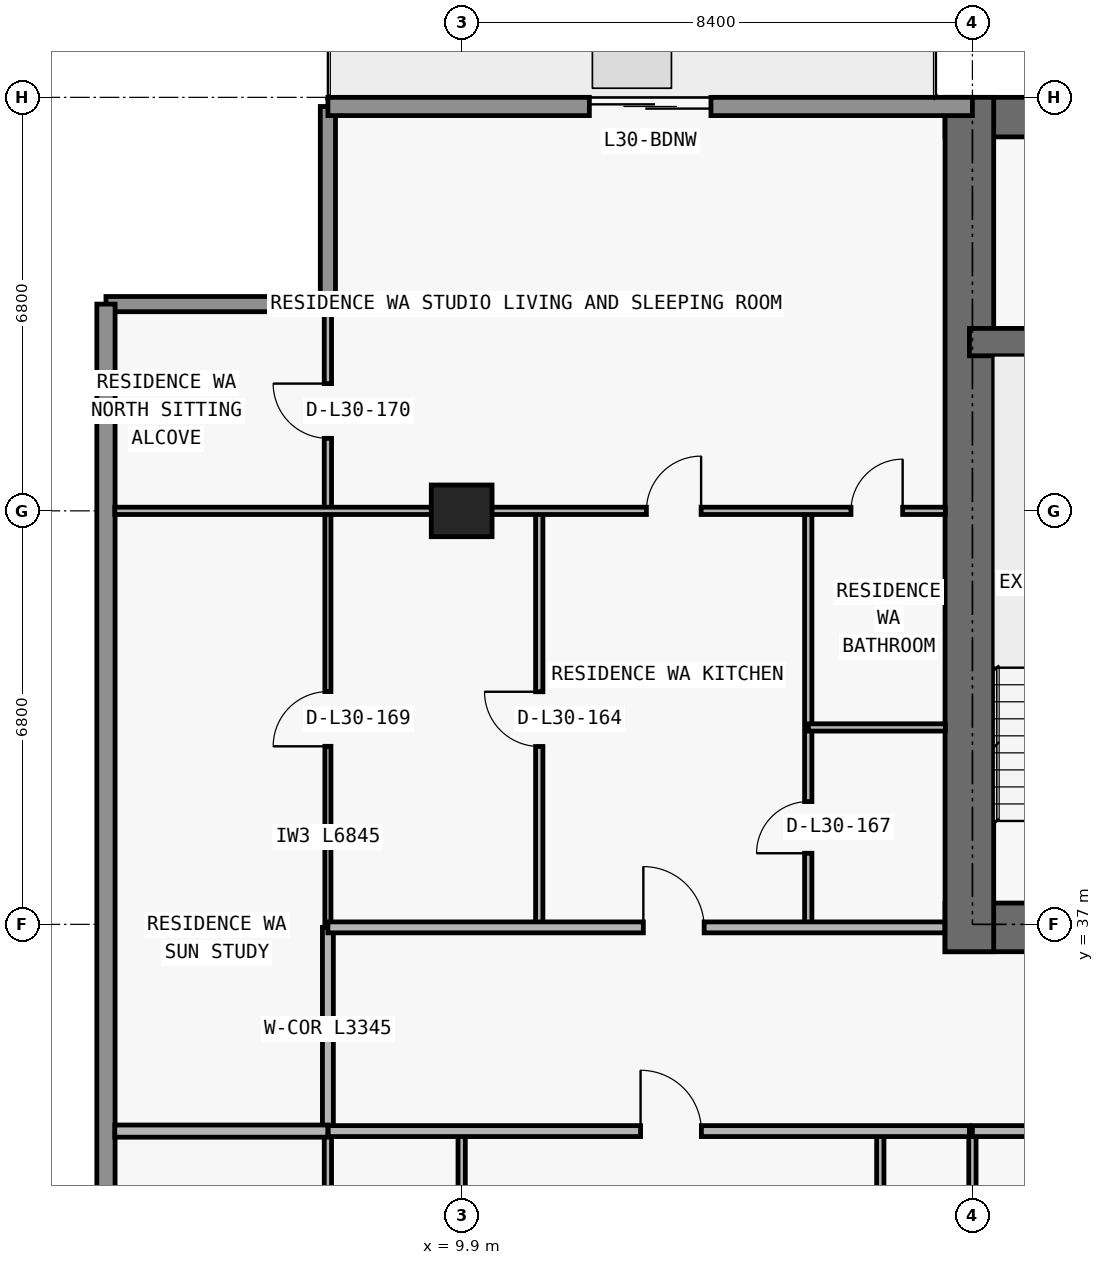
"""IFC4 building model, lengths in metres.
Left out: names, types, materials, properties, quantities, classifications, styles, units other than length and angle.
Written with IfcOpenShell. Run it as: python <this file> out.ifc"""

import sys

from ifc_helpers import new_model, si_unit, direction, frame, frame_2d, origin, origin_2d, place, context, subcontext, project, spatial, rectangle, extrude, element, fill, save


model = new_model("IFC4")
c1 = context("Model", 3, precision=1e-05, world=origin(), true_north=direction((0.0, 1.0)))
c2 = subcontext(c1, "Body", "Model", "MODEL_VIEW")
j1 = project(units=[si_unit("LENGTHUNIT", "METRE"), si_unit("PLANEANGLEUNIT", "RADIAN")], contexts=[c1])
p1 = place(None, origin())
s1 = spatial("IfcSite", under=j1, at=p1, CompositionType="ELEMENT")
p2 = place(p1, origin())
s2 = spatial("IfcBuilding", under=s1, at=p2, CompositionType="ELEMENT")
p3 = place(p2, frame((0.0, 0.0, 112.5)))
s3 = spatial("IfcBuildingStorey", under=s2, at=p3, CompositionType="ELEMENT", Elevation=112.5)
p4 = place(p3, frame((9.9, 43.8, 0.0), z_axis=(0.0, 0.0, 1.0), x_axis=(1.0, 0.0, 0.0)))
e1 = element("IfcColumn", 1, at=p4, inside=s3, PredefinedType="COLUMN", context=c2, shape_type="SweptSolid", body=[
    extrude(rectangle(XDim=1.0, YDim=0.85, at=origin_2d()), origin(), (0.0, 0.0, 1.0), 3.05),
])
p5 = place(p3, frame((17.85, 36.95, 0.0), z_axis=(0.0, 0.0, 1.0), x_axis=(1.0, 0.0, 0.0)))
e2 = element("IfcWall", 2, at=p5, inside=s3, PredefinedType="SHEAR", context=c2, shape_type="SweptSolid", body=[
    extrude(rectangle(XDim=42.1, YDim=0.8, at=frame_2d((21.05, 0.0))), origin(), (0.0, 0.0, 1.0), 3.05),
])
p6 = place(p5, frame((14.45, 0.0, 0.0)))
e3 = element("IfcOpeningElement", 3, at=p6, cuts=e2, PredefinedType="OPENING", context=c2, shape_type="SweptSolid", body=[
    extrude(rectangle(XDim=1.1, YDim=2.15, at=frame_2d((0.55, 1.075))), frame((0.0, 0.41, 0.0), z_axis=(0.0, -1.0, 0.0), x_axis=(1.0, 0.0, 0.0)), (0.0, 0.0, 1.0), 0.82),
])
p7 = place(p5, frame((6.3, 0.0, 0.0)))
e4 = element("IfcOpeningElement", 4, at=p7, cuts=e2, PredefinedType="OPENING", context=c2, shape_type="SweptSolid", body=[
    extrude(rectangle(XDim=1.05, YDim=2.15, at=frame_2d((0.525, 1.075))), frame((0.0, 0.41, 0.0), z_axis=(0.0, -1.0, 0.0), x_axis=(1.0, 0.0, 0.0)), (0.0, 0.0, 1.0), 0.82),
])
p8 = place(p5, frame((34.8, 0.0, 0.0)))
e5 = element("IfcOpeningElement", 5, at=p8, cuts=e2, PredefinedType="OPENING", context=c2, shape_type="SweptSolid", body=[
    extrude(rectangle(XDim=1.05, YDim=2.15, at=frame_2d((0.525, 1.075))), frame((0.0, 0.41, 0.0), z_axis=(0.0, -1.0, 0.0), x_axis=(1.0, 0.0, 0.0)), (0.0, 0.0, 1.0), 0.82),
])
p9 = place(p5, frame((10.913, 0.0, 0.0)))
e6 = element("IfcOpeningElement", 6, at=p9, cuts=e2, PredefinedType="OPENING", context=c2, shape_type="SweptSolid", body=[
    extrude(rectangle(XDim=1.05, YDim=2.15, at=frame_2d((0.525, 1.075))), frame((0.0, 0.41, 0.0), z_axis=(0.0, -1.0, 0.0), x_axis=(1.0, 0.0, 0.0)), (0.0, 0.0, 1.0), 0.82),
])
p10 = place(p5, frame((24.15, 0.0, 0.0)))
e7 = element("IfcOpeningElement", 7, at=p10, cuts=e2, PredefinedType="OPENING", context=c2, shape_type="SweptSolid", body=[
    extrude(rectangle(XDim=1.05, YDim=2.15, at=frame_2d((0.525, 1.075))), frame((0.0, 0.41, 0.0), z_axis=(0.0, -1.0, 0.0), x_axis=(1.0, 0.0, 0.0)), (0.0, 0.0, 1.0), 0.82),
])
p11 = place(p3, frame((17.85, 50.275, 0.0), z_axis=(0.0, 0.0, 1.0), x_axis=(1.0, 0.0, 0.0)))
e8 = element("IfcWall", 8, at=p11, inside=s3, PredefinedType="SHEAR", context=c2, shape_type="SweptSolid", body=[
    extrude(rectangle(XDim=42.1, YDim=0.65, at=frame_2d((21.05, 0.0))), origin(), (0.0, 0.0, 1.0), 3.05),
])
p12 = place(p3, frame((18.25, 36.55, 0.0), z_axis=(0.0, 0.0, 1.0), x_axis=(0.0, 1.0, 0.0)))
e9 = element("IfcWall", 9, at=p12, inside=s3, PredefinedType="SHEAR", context=c2, shape_type="SweptSolid", body=[
    extrude(rectangle(XDim=14.05, YDim=0.8, at=frame_2d((7.025, 0.0))), origin(), (0.0, 0.0, 1.0), 3.05),
])
p13 = place(p3, frame((18.25, 46.575, 0.0), z_axis=(0.0, 0.0, 1.0), x_axis=(1.0, 0.0, 0.0)))
e10 = element("IfcWall", 10, at=p13, inside=s3, PredefinedType="SHEAR", context=c2, shape_type="SweptSolid", body=[
    extrude(rectangle(XDim=41.3, YDim=0.45, at=frame_2d((20.65, 0.0))), origin(), (0.0, 0.0, 1.0), 3.05),
])
p14 = place(p13, frame((7.625, 0.0, 0.0)))
e11 = element("IfcOpeningElement", 11, at=p14, cuts=e10, PredefinedType="OPENING", context=c2, shape_type="SweptSolid", body=[
    extrude(rectangle(XDim=1.05, YDim=2.15, at=frame_2d((0.525, 1.075))), frame((0.0, 0.235, 0.0), z_axis=(0.0, -1.0, 0.0), x_axis=(1.0, 0.0, 0.0)), (0.0, 0.0, 1.0), 0.47),
])
p15 = place(p13, frame((32.675, 0.0, 0.0)))
e12 = element("IfcOpeningElement", 12, at=p15, cuts=e10, PredefinedType="OPENING", context=c2, shape_type="SweptSolid", body=[
    extrude(rectangle(XDim=1.05, YDim=2.15, at=frame_2d((0.525, 1.075))), frame((0.0, 0.235, 0.0), z_axis=(0.0, -1.0, 0.0), x_axis=(1.0, 0.0, 0.0)), (0.0, 0.0, 1.0), 0.47),
])
p16 = place(p3, frame((4.05, 47.2, 0.0), z_axis=(0.0, 0.0, 1.0), x_axis=(1.0, 0.0, 0.0)))
e13 = element("IfcWall", 13, at=p16, inside=s3, PredefinedType="ELEMENTEDWALL", context=c2, shape_type="SweptSolid", body=[
    extrude(rectangle(XDim=3.65, YDim=0.25, at=frame_2d((1.825, 0.0))), origin(), (0.0, 0.0, 1.0), 3.05),
])
p17 = place(p3, frame((7.7, 47.2, 0.0), z_axis=(0.0, 0.0, 1.0), x_axis=(0.0, 1.0, 0.0)))
e14 = element("IfcWall", 14, at=p17, inside=s3, PredefinedType="ELEMENTEDWALL", context=c2, shape_type="SweptSolid", body=[
    extrude(rectangle(XDim=3.25, YDim=0.25, at=frame_2d((1.625, 0.0))), origin(), (0.0, 0.0, 1.0), 3.05),
])
p18 = place(p3, frame((4.05, 28.0, 0.0), z_axis=(0.0, 0.0, 1.0), x_axis=(0.0, 1.0, 0.0)))
e15 = element("IfcWall", 15, at=p18, inside=s3, PredefinedType="STANDARD", context=c2, shape_type="SweptSolid", body=[
    extrude(rectangle(XDim=19.2, YDim=0.3, at=frame_2d((9.6, 0.0))), origin(), (0.0, 0.0, 1.0), 3.05),
])
p19 = place(p3, frame((7.7, 50.45, 0.0), z_axis=(0.0, 0.0, 1.0), x_axis=(1.0, 0.0, 0.0)))
e16 = element("IfcWall", 16, at=p19, inside=s3, PredefinedType="STANDARD", context=c2, shape_type="SweptSolid", body=[
    extrude(rectangle(XDim=10.6, YDim=0.3, at=frame_2d((5.3, 0.0))), origin(), (0.0, 0.0, 1.0), 3.05),
])
p20 = place(p19, frame((4.3, 0.0, 0.0)))
e17 = element("IfcOpeningElement", 17, at=p20, cuts=e16, PredefinedType="OPENING", context=c2, shape_type="SweptSolid", body=[
    extrude(rectangle(XDim=2.0, YDim=2.3, at=frame_2d((1.0, 1.15))), frame((0.0, 0.16, 0.0), z_axis=(0.0, -1.0, 0.0), x_axis=(1.0, 0.0, 0.0)), (0.0, 0.0, 1.0), 0.32),
])
p21 = place(p3, frame((7.7, 27.08, 0.0), z_axis=(0.0, 0.0, 1.0), x_axis=(0.0, 1.0, 0.0)))
e18 = element("IfcWall", 18, at=p21, inside=s3, PredefinedType="PARTITIONING", context=c2, shape_type="SweptSolid", body=[
    extrude(rectangle(XDim=6.52, YDim=0.12, at=frame_2d((3.26, 0.0))), origin(), (0.0, 0.0, 1.0), 3.05),
])
p22 = place(p3, frame((7.7, 33.605, 0.0), z_axis=(0.0, 0.0, 1.0), x_axis=(0.0, 1.0, 0.0)))
e19 = element("IfcWall", 19, at=p22, inside=s3, PredefinedType="PARTITIONING", context=c2, shape_type="SweptSolid", body=[
    extrude(rectangle(XDim=3.345, YDim=0.18, at=frame_2d((1.672, 0.0))), origin(), (0.0, 0.0, 1.0), 3.05),
])
p23 = place(p3, frame((7.7, 36.955, 0.0), z_axis=(0.0, 0.0, 1.0), x_axis=(0.0, 1.0, 0.0)))
e20 = element("IfcWall", 20, at=p23, inside=s3, PredefinedType="MOVABLE", context=c2, shape_type="SweptSolid", body=[
    extrude(rectangle(XDim=6.845, YDim=0.1, at=frame_2d((3.422, 0.0))), origin(), (0.0, 0.0, 1.0), 3.05),
])
p24 = place(p23, frame((2.972, 0.0, 0.0)))
e21 = element("IfcOpeningElement", 21, at=p24, cuts=e20, PredefinedType="OPENING", context=c2, shape_type="SweptSolid", body=[
    extrude(rectangle(XDim=0.9, YDim=2.15, at=frame_2d((0.45, 1.075))), frame((0.0, 0.06, 0.0), z_axis=(0.0, -1.0, 0.0), x_axis=(1.0, 0.0, 0.0)), (0.0, 0.0, 1.0), 0.12),
])
p25 = place(p3, frame((7.7, 43.805, 0.0), z_axis=(0.0, 0.0, 1.0), x_axis=(0.0, 1.0, 0.0)))
e22 = element("IfcWall", 22, at=p25, inside=s3, PredefinedType="PARTITIONING", context=c2, shape_type="SweptSolid", body=[
    extrude(rectangle(XDim=3.275, YDim=0.12, at=frame_2d((1.638, 0.0))), origin(), (0.0, 0.0, 1.0), 3.05),
])
p26 = place(p25, frame((1.188, 0.0, 0.0)))
e23 = element("IfcOpeningElement", 23, at=p26, cuts=e22, PredefinedType="OPENING", context=c2, shape_type="SweptSolid", body=[
    extrude(rectangle(XDim=0.9, YDim=2.15, at=frame_2d((0.45, 1.075))), frame((0.0, 0.07, 0.0), z_axis=(0.0, -1.0, 0.0), x_axis=(1.0, 0.0, 0.0)), (0.0, 0.0, 1.0), 0.14),
])
p27 = place(p3, frame((9.9, 27.08, 0.0), z_axis=(0.0, 0.0, 1.0), x_axis=(0.0, 1.0, 0.0)))
e24 = element("IfcWall", 24, at=p27, inside=s3, PredefinedType="PARTITIONING", context=c2, shape_type="SweptSolid", body=[
    extrude(rectangle(XDim=6.52, YDim=0.12, at=frame_2d((3.26, 0.0))), origin(), (0.0, 0.0, 1.0), 2.174),
])
p28 = place(p3, frame((11.176, 36.95, 0.0), z_axis=(0.0, 0.0, 1.0), x_axis=(0.0, 1.0, 0.0)))
e25 = element("IfcWall", 25, at=p28, inside=s3, PredefinedType="PARTITIONING", context=c2, shape_type="SweptSolid", body=[
    extrude(rectangle(XDim=6.85, YDim=0.12, at=frame_2d((3.425, 0.0))), origin(), (0.0, 0.0, 1.0), 3.05),
])
p29 = place(p28, frame((2.975, 0.0, 0.0)))
e26 = element("IfcOpeningElement", 26, at=p29, cuts=e25, PredefinedType="OPENING", context=c2, shape_type="SweptSolid", body=[
    extrude(rectangle(XDim=0.9, YDim=2.15, at=frame_2d((0.45, 1.075))), frame((0.0, 0.07, 0.0), z_axis=(0.0, -1.0, 0.0), x_axis=(1.0, 0.0, 0.0)), (0.0, 0.0, 1.0), 0.14),
])
p30 = place(p3, frame((15.6, 36.95, 0.0), z_axis=(0.0, 0.0, 1.0), x_axis=(0.0, 1.0, 0.0)))
e27 = element("IfcWall", 27, at=p30, inside=s3, PredefinedType="PARTITIONING", context=c2, shape_type="SweptSolid", body=[
    extrude(rectangle(XDim=6.85, YDim=0.12, at=frame_2d((3.425, 0.0))), origin(), (0.0, 0.0, 1.0), 3.05),
])
p31 = place(p30, frame((1.219, 0.0, 0.0)))
e28 = element("IfcOpeningElement", 28, at=p31, cuts=e27, PredefinedType="OPENING", context=c2, shape_type="SweptSolid", body=[
    extrude(rectangle(XDim=0.85, YDim=2.1, at=frame_2d((0.425, 1.05))), frame((0.0, 0.07, 0.0), z_axis=(0.0, -1.0, 0.0), x_axis=(1.0, 0.0, 0.0)), (0.0, 0.0, 1.0), 0.14),
])
p32 = place(p3, frame((16.785, 27.08, 0.0), z_axis=(0.0, 0.0, 1.0), x_axis=(0.0, 1.0, 0.0)))
e29 = element("IfcWall", 29, at=p32, inside=s3, PredefinedType="PARTITIONING", context=c2, shape_type="SweptSolid", body=[
    extrude(rectangle(XDim=6.52, YDim=0.12, at=frame_2d((3.26, 0.0))), origin(), (0.0, 0.0, 1.0), 3.05),
])
p33 = place(p32, frame((3.285, 0.0, 0.0)))
e30 = element("IfcOpeningElement", 30, at=p33, cuts=e29, PredefinedType="OPENING", context=c2, shape_type="SweptSolid", body=[
    extrude(rectangle(XDim=0.85, YDim=2.1, at=frame_2d((0.425, 1.05))), frame((0.0, 0.07, 0.0), z_axis=(0.0, -1.0, 0.0), x_axis=(1.0, 0.0, 0.0)), (0.0, 0.0, 1.0), 0.14),
])
p34 = place(p3, frame((18.3, 27.08, 0.0), z_axis=(0.0, 0.0, 1.0), x_axis=(0.0, 1.0, 0.0)))
e31 = element("IfcWall", 31, at=p34, inside=s3, PredefinedType="PARTITIONING", context=c2, shape_type="SweptSolid", body=[
    extrude(rectangle(XDim=6.52, YDim=0.12, at=frame_2d((3.26, 0.0))), origin(), (0.0, 0.0, 1.0), 2.174),
])
p35 = place(p3, frame((4.195, 33.6, 0.0), z_axis=(0.0, 0.0, 1.0), x_axis=(1.0, 0.0, 0.0)))
e32 = element("IfcWall", 32, at=p35, inside=s3, PredefinedType="PARTITIONING", context=c2, shape_type="SweptSolid", body=[
    extrude(rectangle(XDim=3.505, YDim=0.2, at=frame_2d((1.752, 0.0))), origin(), (0.0, 0.0, 1.0), 3.05),
])
p36 = place(p3, frame((7.705, 33.6, 0.0), z_axis=(0.0, 0.0, 1.0), x_axis=(1.0, 0.0, 0.0)))
e33 = element("IfcWall", 33, at=p36, inside=s3, PredefinedType="PARTITIONING", context=c2, shape_type="SweptSolid", body=[
    extrude(rectangle(XDim=10.545, YDim=0.18, at=frame_2d((5.272, 0.0))), origin(), (0.0, 0.0, 1.0), 3.05),
])
p37 = place(p36, frame((5.137, 0.0, 0.0)))
e34 = element("IfcOpeningElement", 34, at=p37, cuts=e33, PredefinedType="OPENING", context=c2, shape_type="SweptSolid", body=[
    extrude(rectangle(XDim=1.0, YDim=2.2, at=frame_2d((0.5, 1.1))), frame((0.0, 0.1, 0.0), z_axis=(0.0, -1.0, 0.0), x_axis=(1.0, 0.0, 0.0)), (0.0, 0.0, 1.0), 0.2),
])
p38 = place(p3, frame((18.3, 33.6, 0.0), z_axis=(0.0, 0.0, 1.0), x_axis=(1.0, 0.0, 0.0)))
e35 = element("IfcWall", 35, at=p38, inside=s3, PredefinedType="PARTITIONING", context=c2, shape_type="SweptSolid", body=[
    extrude(rectangle(XDim=41.2, YDim=0.18, at=frame_2d((20.6, 0.0))), origin(), (0.0, 0.0, 1.0), 3.05),
])
p39 = place(p38, frame((11.35, 0.0, 0.0)))
e36 = element("IfcOpeningElement", 36, at=p39, cuts=e35, PredefinedType="OPENING", context=c2, shape_type="SweptSolid", body=[
    extrude(rectangle(XDim=1.0, YDim=2.2, at=frame_2d((0.5, 1.1))), frame((0.0, 0.1, 0.0), z_axis=(0.0, -1.0, 0.0), x_axis=(1.0, 0.0, 0.0)), (0.0, 0.0, 1.0), 0.2),
])
p40 = place(p38, frame((27.275, 0.0, 0.0)))
e37 = element("IfcOpeningElement", 37, at=p40, cuts=e35, PredefinedType="OPENING", context=c2, shape_type="SweptSolid", body=[
    extrude(rectangle(XDim=1.0, YDim=2.2, at=frame_2d((0.5, 1.1))), frame((0.0, 0.1, 0.0), z_axis=(0.0, -1.0, 0.0), x_axis=(1.0, 0.0, 0.0)), (0.0, 0.0, 1.0), 0.2),
])
p41 = place(p38, frame((35.675, 0.0, 0.0)))
e38 = element("IfcOpeningElement", 38, at=p41, cuts=e35, PredefinedType="OPENING", context=c2, shape_type="SweptSolid", body=[
    extrude(rectangle(XDim=1.0, YDim=2.2, at=frame_2d((0.5, 1.1))), frame((0.0, 0.1, 0.0), z_axis=(0.0, -1.0, 0.0), x_axis=(1.0, 0.0, 0.0)), (0.0, 0.0, 1.0), 0.2),
])
p42 = place(p3, frame((7.7, 36.95, 0.0), z_axis=(0.0, 0.0, 1.0), x_axis=(1.0, 0.0, 0.0)))
e39 = element("IfcWall", 39, at=p42, inside=s3, PredefinedType="PARTITIONING", context=c2, shape_type="SweptSolid", body=[
    extrude(rectangle(XDim=10.145, YDim=0.18, at=frame_2d((5.073, 0.0))), origin(), (0.0, 0.0, 1.0), 3.05),
])
p43 = place(p42, frame((5.188, 0.0, 0.0)))
e40 = element("IfcOpeningElement", 40, at=p43, cuts=e39, PredefinedType="OPENING", context=c2, shape_type="SweptSolid", body=[
    extrude(rectangle(XDim=1.0, YDim=2.2, at=frame_2d((0.5, 1.1))), frame((0.0, 0.1, 0.0), z_axis=(0.0, -1.0, 0.0), x_axis=(1.0, 0.0, 0.0)), (0.0, 0.0, 1.0), 0.2),
])
p44 = place(p3, frame((15.6, 40.238, 0.0), z_axis=(0.0, 0.0, 1.0), x_axis=(1.0, 0.0, 0.0)))
e41 = element("IfcWall", 41, at=p44, inside=s3, PredefinedType="PARTITIONING", context=c2, shape_type="SweptSolid", body=[
    extrude(rectangle(XDim=2.255, YDim=0.12, at=frame_2d((1.127, 0.0))), origin(), (0.0, 0.0, 1.0), 3.05),
])
p45 = place(p3, frame((4.195, 43.8, 0.0), z_axis=(0.0, 0.0, 1.0), x_axis=(1.0, 0.0, 0.0)))
e42 = element("IfcWall", 42, at=p45, inside=s3, PredefinedType="PARTITIONING", context=c2, shape_type="SweptSolid", body=[
    extrude(rectangle(XDim=13.66, YDim=0.12, at=frame_2d((6.83, 0.0))), origin(), (0.0, 0.0, 1.0), 2.339),
])
p46 = place(p45, frame((8.743, 0.0, 0.0)))
e43 = element("IfcOpeningElement", 43, at=p46, cuts=e42, PredefinedType="OPENING", context=c2, shape_type="SweptSolid", body=[
    extrude(rectangle(XDim=0.9, YDim=2.15, at=frame_2d((0.45, 1.075))), frame((0.0, 0.07, 0.0), z_axis=(0.0, -1.0, 0.0), x_axis=(1.0, 0.0, 0.0)), (0.0, 0.0, 1.0), 0.14),
])
p47 = place(p45, frame((12.107, 0.0, 0.0)))
e44 = element("IfcOpeningElement", 44, at=p47, cuts=e42, PredefinedType="OPENING", context=c2, shape_type="SweptSolid", body=[
    extrude(rectangle(XDim=0.85, YDim=2.1, at=frame_2d((0.425, 1.05))), frame((0.0, 0.07, 0.0), z_axis=(0.0, -1.0, 0.0), x_axis=(1.0, 0.0, 0.0)), (0.0, 0.0, 1.0), 0.14),
])
p48 = place(p20, origin())
e45 = element("IfcDoor", 45, at=p48, inside=s3, OperationType="DOUBLE_DOOR_SLIDING", PredefinedType="DOOR", context=c2, shape_type="SweptSolid", body=[
    extrude(rectangle(XDim=2.0, YDim=2.3, at=frame_2d((1.0, 1.15))), frame((0.0, 0.025, 0.0), z_axis=(0.0, -1.0, 0.0), x_axis=(1.0, 0.0, 0.0)), (0.0, 0.0, 1.0), 0.05),
])
fill(e17, e45)
p49 = place(p37, origin())
e46 = element("IfcDoor", 46, at=p49, inside=s3, OperationType="SINGLE_SWING_LEFT", PredefinedType="DOOR", context=c2, shape_type="SweptSolid", body=[
    extrude(rectangle(XDim=1.0, YDim=2.2, at=frame_2d((0.5, 1.1))), frame((0.0, 0.025, 0.0), z_axis=(0.0, -1.0, 0.0), x_axis=(1.0, 0.0, 0.0)), (0.0, 0.0, 1.0), 0.05),
])
fill(e34, e46)
p50 = place(p29, origin())
e47 = element("IfcDoor", 47, at=p50, inside=s3, OperationType="SINGLE_SWING_RIGHT", PredefinedType="DOOR", context=c2, shape_type="SweptSolid", body=[
    extrude(rectangle(XDim=0.9, YDim=2.15, at=frame_2d((0.45, 1.075))), frame((0.0, 0.025, 0.0), z_axis=(0.0, -1.0, 0.0), x_axis=(1.0, 0.0, 0.0)), (0.0, 0.0, 1.0), 0.05),
])
fill(e26, e47)
p51 = place(p43, origin())
e48 = element("IfcDoor", 48, at=p51, inside=s3, OperationType="SINGLE_SWING_LEFT", PredefinedType="DOOR", context=c2, shape_type="SweptSolid", body=[
    extrude(rectangle(XDim=1.0, YDim=2.2, at=frame_2d((0.5, 1.1))), frame((0.0, 0.025, 0.0), z_axis=(0.0, -1.0, 0.0), x_axis=(1.0, 0.0, 0.0)), (0.0, 0.0, 1.0), 0.05),
])
fill(e40, e48)
p52 = place(p46, origin())
e49 = element("IfcDoor", 49, at=p52, inside=s3, OperationType="SINGLE_SWING_RIGHT", PredefinedType="DOOR", context=c2, shape_type="SweptSolid", body=[
    extrude(rectangle(XDim=0.9, YDim=2.15, at=frame_2d((0.45, 1.075))), frame((0.0, 0.025, 0.0), z_axis=(0.0, -1.0, 0.0), x_axis=(1.0, 0.0, 0.0)), (0.0, 0.0, 1.0), 0.05),
])
fill(e43, e49)
p53 = place(p31, origin())
e50 = element("IfcDoor", 50, at=p53, inside=s3, OperationType="SINGLE_SWING_LEFT", PredefinedType="DOOR", context=c2, shape_type="SweptSolid", body=[
    extrude(rectangle(XDim=0.85, YDim=2.1, at=frame_2d((0.425, 1.05))), frame((0.0, 0.025, 0.0), z_axis=(0.0, -1.0, 0.0), x_axis=(1.0, 0.0, 0.0)), (0.0, 0.0, 1.0), 0.05),
])
fill(e28, e50)
p54 = place(p47, origin())
e51 = element("IfcDoor", 51, at=p54, inside=s3, OperationType="SINGLE_SWING_RIGHT", PredefinedType="DOOR", context=c2, shape_type="SweptSolid", body=[
    extrude(rectangle(XDim=0.85, YDim=2.1, at=frame_2d((0.425, 1.05))), frame((0.0, 0.025, 0.0), z_axis=(0.0, -1.0, 0.0), x_axis=(1.0, 0.0, 0.0)), (0.0, 0.0, 1.0), 0.05),
])
fill(e44, e51)
p55 = place(p24, origin())
e52 = element("IfcDoor", 52, at=p55, inside=s3, OperationType="SINGLE_SWING_LEFT", PredefinedType="DOOR", context=c2, shape_type="SweptSolid", body=[
    extrude(rectangle(XDim=0.9, YDim=2.15, at=frame_2d((0.45, 1.075))), frame((0.0, 0.025, 0.0), z_axis=(0.0, -1.0, 0.0), x_axis=(1.0, 0.0, 0.0)), (0.0, 0.0, 1.0), 0.05),
])
fill(e21, e52)
p56 = place(p26, origin())
e53 = element("IfcDoor", 53, at=p56, inside=s3, OperationType="SINGLE_SWING_RIGHT", PredefinedType="DOOR", context=c2, shape_type="SweptSolid", body=[
    extrude(rectangle(XDim=0.9, YDim=2.15, at=frame_2d((0.45, 1.075))), frame((0.0, 0.025, 0.0), z_axis=(0.0, -1.0, 0.0), x_axis=(1.0, 0.0, 0.0)), (0.0, 0.0, 1.0), 0.05),
])
fill(e23, e53)
save(model, sys.argv[1])
